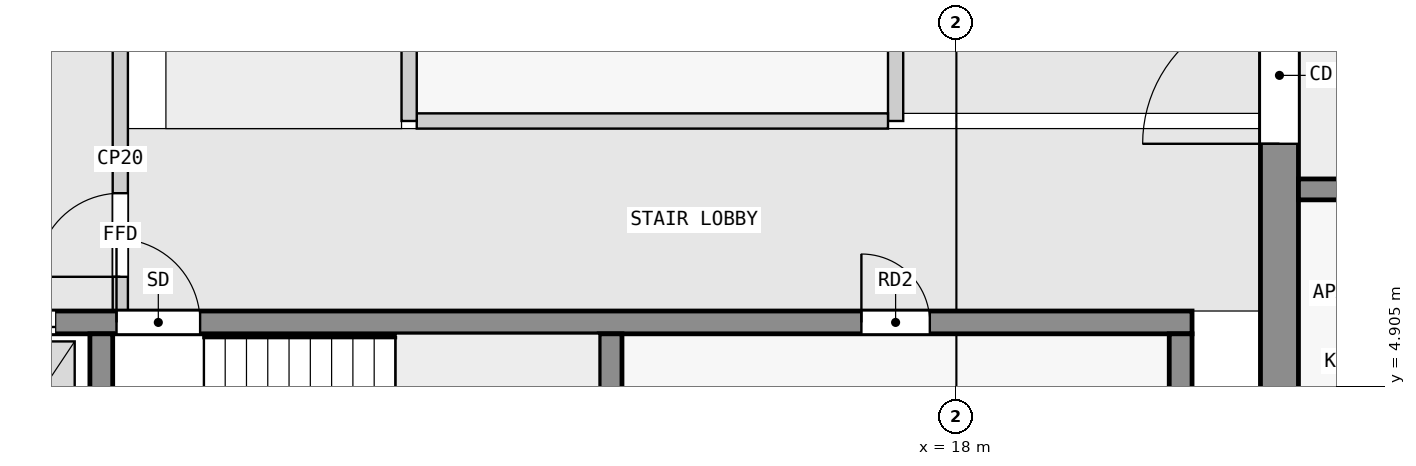
"""IFC4 building model, lengths in metres.
Left out: names, types, materials, properties, quantities, classifications, styles, units other than length and angle.
Written with IfcOpenShell. Run it as: python <this file> out.ifc"""

import sys

from ifc_helpers import new_model, si_unit, direction, frame, frame_2d, origin, place, context, subcontext, project, spatial, rectangle, extrude, element, fill, save


model = new_model("IFC4")
c1 = context("Model", 3, precision=1e-05, world=origin(), true_north=direction((0.0, 1.0)))
c2 = subcontext(c1, "Body", "Model", "MODEL_VIEW")
j1 = project(units=[si_unit("LENGTHUNIT", "METRE"), si_unit("PLANEANGLEUNIT", "RADIAN")], contexts=[c1])
p1 = place(None, origin())
s1 = spatial("IfcSite", under=j1, at=p1, CompositionType="ELEMENT")
p2 = place(p1, origin())
s2 = spatial("IfcBuilding", under=s1, at=p2, CompositionType="ELEMENT")
p3 = place(p2, frame((0.0, 0.0, 218.9)))
s3 = spatial("IfcBuildingStorey", under=s2, at=p3, CompositionType="ELEMENT", Elevation=218.9)
p4 = place(p3, frame((22.25, 2.5, 0.0), z_axis=(0.0, 0.0, 1.0), x_axis=(0.0, 1.0, 0.0)))
e1 = element("IfcWall", 1, at=p4, inside=s3, PredefinedType="SHEAR", context=c2, shape_type="SweptSolid", body=[
    extrude(rectangle(XDim=15.0, YDim=0.5, at=frame_2d((7.5, 0.0))), origin(), (0.0, 0.0, 1.0), 3.25),
])
p5 = place(p4, frame((5.6, 0.0, 0.0)))
e2 = element("IfcOpeningElement", 2, at=p5, cuts=e1, PredefinedType="OPENING", context=c2, shape_type="SweptSolid", body=[
    extrude(rectangle(XDim=1.8, YDim=2.1, at=frame_2d((0.9, 1.05))), frame((0.0, 0.26, 0.0), z_axis=(0.0, -1.0, 0.0), x_axis=(1.0, 0.0, 0.0)), (0.0, 0.0, 1.0), 0.52),
])
for number, where, z_axis, x_axis in (
    (3, (6.75, 2.8, 0.0), (0.0, 0.0, 1.0), (0.0, 1.0, 0.0)),
    (4, (13.45, 2.8, 0.0), (0.0, 0.0, 1.0), (0.0, 1.0, 0.0)),
    (5, (20.95, 2.8, 0.0), (0.0, 0.0, 1.0), (0.0, 1.0, 0.0)),
):
    element("IfcWall", number, at=place(p3, frame(where, z_axis=z_axis, x_axis=x_axis)), inside=s3, PredefinedType="SHEAR", context=c2, shape_type="SweptSolid", body=[
        extrude(rectangle(XDim=2.8, YDim=0.3, at=frame_2d((1.4, 0.0))), origin(), (0.0, 0.0, 1.0), 3.25),
    ])
p6 = place(p3, frame((2.3, 5.75, 0.0), z_axis=(0.0, 0.0, 1.0), x_axis=(1.0, 0.0, 0.0)))
e6 = element("IfcWall", 6, at=p6, inside=s3, PredefinedType="SHEAR", context=c2, shape_type="SweptSolid", body=[
    extrude(rectangle(XDim=18.8, YDim=0.3, at=frame_2d((9.4, 0.0))), origin(), (0.0, 0.0, 1.0), 3.25),
])
p7 = place(p6, frame((4.65, 0.0, 0.0)))
e7 = element("IfcOpeningElement", 7, at=p7, cuts=e6, PredefinedType="OPENING", context=c2, shape_type="SweptSolid", body=[
    extrude(rectangle(XDim=1.1, YDim=2.1, at=frame_2d((0.55, 1.05))), frame((0.0, 0.16, 0.0), z_axis=(0.0, -1.0, 0.0), x_axis=(1.0, 0.0, 0.0)), (0.0, 0.0, 1.0), 0.32),
])
p8 = place(p6, frame((0.45, 0.0, 0.0)))
e8 = element("IfcOpeningElement", 8, at=p8, cuts=e6, PredefinedType="OPENING", context=c2, shape_type="SweptSolid", body=[
    extrude(rectangle(XDim=1.1, YDim=2.1, at=frame_2d((0.55, 1.05))), frame((0.0, 0.16, 0.0), z_axis=(0.0, -1.0, 0.0), x_axis=(1.0, 0.0, 0.0)), (0.0, 0.0, 1.0), 0.32),
])
p9 = place(p6, frame((2.75, 0.0, 0.0)))
e9 = element("IfcOpeningElement", 9, at=p9, cuts=e6, PredefinedType="OPENING", context=c2, shape_type="SweptSolid", body=[
    extrude(rectangle(XDim=1.1, YDim=2.1, at=frame_2d((0.55, 1.05))), frame((0.0, 0.16, 0.0), z_axis=(0.0, -1.0, 0.0), x_axis=(1.0, 0.0, 0.0)), (0.0, 0.0, 1.0), 0.32),
])
p10 = place(p6, frame((14.45, 0.0, 0.0)))
e10 = element("IfcOpeningElement", 10, at=p10, cuts=e6, PredefinedType="OPENING", context=c2, shape_type="SweptSolid", body=[
    extrude(rectangle(XDim=0.9, YDim=2.1, at=frame_2d((0.45, 1.05))), frame((0.0, 0.16, 0.0), z_axis=(0.0, -1.0, 0.0), x_axis=(1.0, 0.0, 0.0)), (0.0, 0.0, 1.0), 0.32),
])
p11 = place(p3, frame((22.5, 7.5, 0.0), z_axis=(0.0, 0.0, 1.0), x_axis=(1.0, 0.0, 0.0)))
e11 = element("IfcWall", 11, at=p11, inside=s3, PredefinedType="SHEAR", context=c2, shape_type="SweptSolid", body=[
    extrude(rectangle(XDim=22.5, YDim=0.275, at=frame_2d((11.25, 0.0))), origin(), (0.0, 0.0, 1.0), 3.25),
])
p12 = place(p11, frame((4.05, 0.0, 0.0)))
e12 = element("IfcOpeningElement", 12, at=p12, cuts=e11, PredefinedType="OPENING", context=c2, shape_type="SweptSolid", body=[
    extrude(rectangle(XDim=1.0, YDim=2.1, at=frame_2d((0.5, 1.05))), frame((0.0, 0.147, 0.0), z_axis=(0.0, -1.0, 0.0), x_axis=(1.0, 0.0, 0.0)), (0.0, 0.0, 1.0), 0.295),
])
p13 = place(p11, frame((10.75, 0.0, 0.0)))
e13 = element("IfcOpeningElement", 13, at=p13, cuts=e11, PredefinedType="OPENING", context=c2, shape_type="SweptSolid", body=[
    extrude(rectangle(XDim=1.0, YDim=2.1, at=frame_2d((0.5, 1.05))), frame((0.0, 0.147, 0.0), z_axis=(0.0, -1.0, 0.0), x_axis=(1.0, 0.0, 0.0)), (0.0, 0.0, 1.0), 0.295),
])
p14 = place(p11, frame((15.25, 0.0, 0.0)))
e14 = element("IfcOpeningElement", 14, at=p14, cuts=e11, PredefinedType="OPENING", context=c2, shape_type="SweptSolid", body=[
    extrude(rectangle(XDim=1.0, YDim=2.1, at=frame_2d((0.5, 1.05))), frame((0.0, 0.147, 0.0), z_axis=(0.0, -1.0, 0.0), x_axis=(1.0, 0.0, 0.0)), (0.0, 0.0, 1.0), 0.295),
])
p15 = place(p11, frame((18.75, 0.0, 0.0)))
e15 = element("IfcOpeningElement", 15, at=p15, cuts=e11, PredefinedType="OPENING", context=c2, shape_type="SweptSolid", body=[
    extrude(rectangle(XDim=0.9, YDim=2.1, at=frame_2d((0.45, 1.05))), frame((0.0, 0.147, 0.0), z_axis=(0.0, -1.0, 0.0), x_axis=(1.0, 0.0, 0.0)), (0.0, 0.0, 1.0), 0.295),
])
p16 = place(p11, frame((20.95, 0.0, 0.0)))
e16 = element("IfcOpeningElement", 16, at=p16, cuts=e11, PredefinedType="OPENING", context=c2, shape_type="SweptSolid", body=[
    extrude(rectangle(XDim=1.0, YDim=2.1, at=frame_2d((0.5, 1.05))), frame((0.0, 0.147, 0.0), z_axis=(0.0, -1.0, 0.0), x_axis=(1.0, 0.0, 0.0)), (0.0, 0.0, 1.0), 0.295),
])
p17 = place(p3, frame((7.0, 5.9, 0.0), z_axis=(0.0, 0.0, 1.0), x_axis=(0.0, 1.0, 0.0)))
e17 = element("IfcWall", 17, at=p17, inside=s3, PredefinedType="PARTITIONING", context=c2, shape_type="SweptSolid", body=[
    extrude(rectangle(XDim=4.0, YDim=0.2, at=frame_2d((2.0, 0.0))), origin(), (0.0, 0.0, 1.0), 3.25),
])
p18 = place(p17, frame((0.45, 0.0, 0.0)))
e18 = element("IfcOpeningElement", 18, at=p18, cuts=e17, PredefinedType="OPENING", context=c2, shape_type="SweptSolid", body=[
    extrude(rectangle(XDim=1.1, YDim=2.1, at=frame_2d((0.55, 1.05))), frame((0.0, 0.11, 0.0), z_axis=(0.0, -1.0, 0.0), x_axis=(1.0, 0.0, 0.0)), (0.0, 0.0, 1.0), 0.22),
])
p19 = place(p3, frame((10.8, 8.4, 0.0), z_axis=(0.0, 0.0, 1.0), x_axis=(0.0, 1.0, 0.0)))
e19 = element("IfcWall", 19, at=p19, inside=s3, PredefinedType="PARTITIONING", context=c2, shape_type="SweptSolid", body=[
    extrude(rectangle(XDim=3.8, YDim=0.2, at=frame_2d((1.9, 0.0))), origin(), (0.0, 0.0, 1.0), 3.25),
])
p20 = place(p3, frame((10.9, 8.4, 0.0), z_axis=(0.0, 0.0, 1.0), x_axis=(1.0, 0.0, 0.0)))
e20 = element("IfcWall", 20, at=p20, inside=s3, PredefinedType="PARTITIONING", context=c2, shape_type="SweptSolid", body=[
    extrude(rectangle(XDim=6.2, YDim=0.2, at=frame_2d((3.1, 0.0))), origin(), (0.0, 0.0, 1.0), 3.25),
])
p21 = place(p3, frame((17.2, 8.4, 0.0), z_axis=(0.0, 0.0, 1.0), x_axis=(0.0, 1.0, 0.0)))
e21 = element("IfcWall", 21, at=p21, inside=s3, PredefinedType="PARTITIONING", context=c2, shape_type="SweptSolid", body=[
    extrude(rectangle(XDim=3.8, YDim=0.2, at=frame_2d((1.9, 0.0))), origin(), (0.0, 0.0, 1.0), 3.25),
])
p22 = place(p18, origin())
e22 = element("IfcDoor", 22, at=p22, inside=s3, OperationType="SINGLE_SWING_LEFT", PredefinedType="DOOR", context=c2, shape_type="SweptSolid", body=[
    extrude(rectangle(XDim=1.1, YDim=2.1, at=frame_2d((0.55, 1.05))), frame((0.0, 0.025, 0.0), z_axis=(0.0, -1.0, 0.0), x_axis=(1.0, 0.0, 0.0)), (0.0, 0.0, 1.0), 0.05),
])
fill(e18, e22)
p23 = place(p7, origin())
e23 = element("IfcDoor", 23, at=p23, inside=s3, OperationType="SINGLE_SWING_LEFT", PredefinedType="DOOR", context=c2, shape_type="SweptSolid", body=[
    extrude(rectangle(XDim=1.1, YDim=2.1, at=frame_2d((0.55, 1.05))), frame((0.0, 0.025, 0.0), z_axis=(0.0, -1.0, 0.0), x_axis=(1.0, 0.0, 0.0)), (0.0, 0.0, 1.0), 0.05),
])
fill(e7, e23)
p24 = place(p9, origin())
e24 = element("IfcDoor", 24, at=p24, inside=s3, OperationType="DOUBLE_DOOR_SLIDING", PredefinedType="DOOR", context=c2, shape_type="SweptSolid", body=[
    extrude(rectangle(XDim=1.1, YDim=2.1, at=frame_2d((0.55, 1.05))), frame((0.0, 0.025, 0.0), z_axis=(0.0, -1.0, 0.0), x_axis=(1.0, 0.0, 0.0)), (0.0, 0.0, 1.0), 0.05),
])
fill(e9, e24)
p25 = place(p5, origin())
e25 = element("IfcDoor", 25, at=p25, inside=s3, OperationType="DOUBLE_DOOR_SINGLE_SWING", PredefinedType="DOOR", context=c2, shape_type="SweptSolid", body=[
    extrude(rectangle(XDim=1.8, YDim=2.1, at=frame_2d((0.9, 1.05))), frame((0.0, 0.025, 0.0), z_axis=(0.0, -1.0, 0.0), x_axis=(1.0, 0.0, 0.0)), (0.0, 0.0, 1.0), 0.05),
])
fill(e2, e25)
p26 = place(p10, origin())
e26 = element("IfcDoor", 26, at=p26, inside=s3, OperationType="SINGLE_SWING_LEFT", PredefinedType="DOOR", context=c2, shape_type="SweptSolid", body=[
    extrude(rectangle(XDim=0.9, YDim=2.1, at=frame_2d((0.45, 1.05))), frame((0.0, 0.025, 0.0), z_axis=(0.0, -1.0, 0.0), x_axis=(1.0, 0.0, 0.0)), (0.0, 0.0, 1.0), 0.05),
])
fill(e10, e26)
save(model, sys.argv[1])
